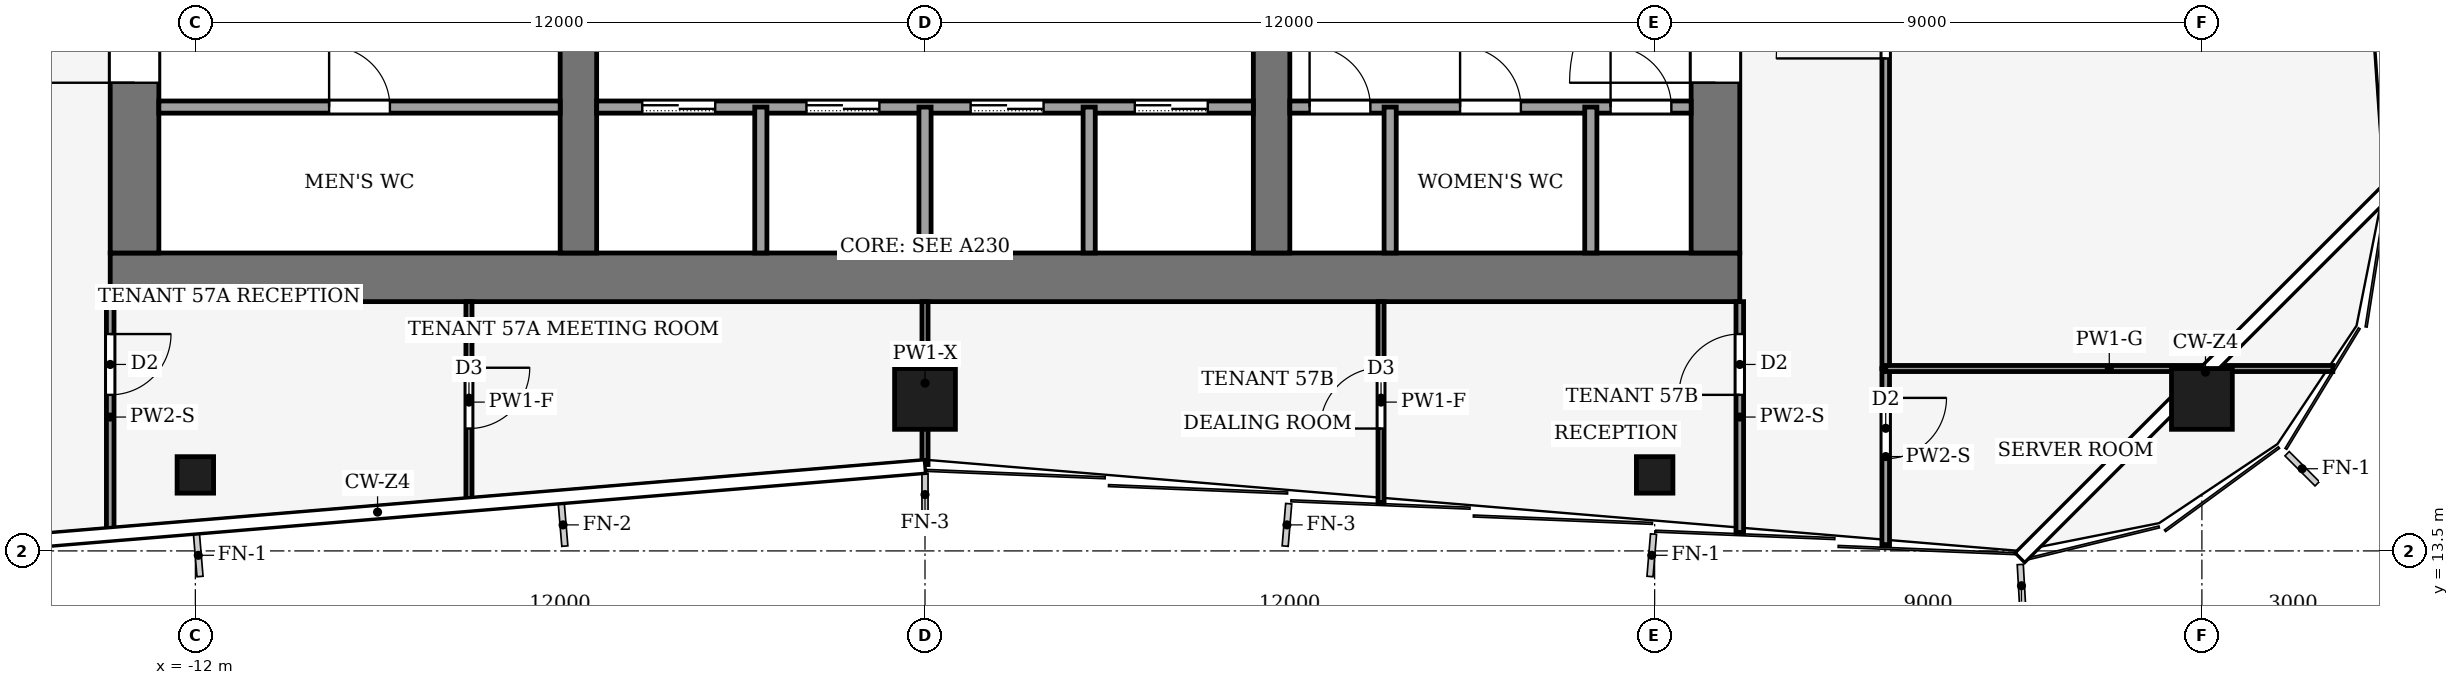
"""IFC4 building model, lengths in metres.
Left out: names, types, materials, properties, quantities, classifications, styles, units other than length and angle.
Written with IfcOpenShell. Run it as: python <this file> out.ifc"""

import sys

from ifc_helpers import new_model, si_unit, direction, frame, frame_2d, origin, origin_2d, place, context, subcontext, project, spatial, rectangle, hollow_rectangle, extrude, element, fill, save


model = new_model("IFC4")
c1 = context("Model", 3, precision=1e-05, world=origin(), true_north=direction((0.0, 1.0)))
c2 = subcontext(c1, "Body", "Model", "MODEL_VIEW")
j1 = project(units=[si_unit("LENGTHUNIT", "METRE"), si_unit("PLANEANGLEUNIT", "RADIAN")], contexts=[c1])
p1 = place(None, origin())
s1 = spatial("IfcSite", under=j1, at=p1, CompositionType="ELEMENT")
p2 = place(p1, origin())
s2 = spatial("IfcBuilding", under=s1, at=p2, CompositionType="ELEMENT")
p3 = place(p2, frame((0.0, 0.0, 250.0)))
s3 = spatial("IfcBuildingStorey", under=s2, at=p3, CompositionType="ELEMENT", Elevation=250.0)
p4 = place(p3, frame((-13.4, 18.0, -0.13), z_axis=(0.0, 0.0, 1.0), x_axis=(1.0, 0.0, 0.0)))
e1 = element("IfcWall", 1, at=p4, inside=s3, PredefinedType="SHEAR", context=c2, shape_type="SweptSolid", body=[
    extrude(rectangle(XDim=26.8, YDim=0.8, at=frame_2d((13.4, 0.0))), origin(), (0.0, 0.0, 1.0), 4.0),
])
p5 = place(p3, frame((-13.0, 18.4, -0.13), z_axis=(0.0, 0.0, 1.0), x_axis=(0.0, 1.0, 0.0)))
e2 = element("IfcWall", 2, at=p5, inside=s3, PredefinedType="SHEAR", context=c2, shape_type="SweptSolid", body=[
    extrude(rectangle(XDim=19.2, YDim=0.8, at=frame_2d((9.6, 0.0))), origin(), (0.0, 0.0, 1.0), 4.0),
])
p6 = place(p5, frame((2.8, 0.0, 0.13)))
e3 = element("IfcOpeningElement", 3, at=p6, cuts=e2, PredefinedType="OPENING", context=c2, shape_type="SweptSolid", body=[
    extrude(rectangle(XDim=2.4, YDim=2.4, at=frame_2d((1.2, 1.2))), frame((0.0, 0.41, 0.0), z_axis=(0.0, -1.0, 0.0), x_axis=(1.0, 0.0, 0.0)), (0.0, 0.0, 1.0), 0.82),
])
p7 = place(p5, frame((13.4, 0.0, 0.13)))
e4 = element("IfcOpeningElement", 4, at=p7, cuts=e2, PredefinedType="OPENING", context=c2, shape_type="SweptSolid", body=[
    extrude(rectangle(XDim=1.4, YDim=2.2, at=frame_2d((0.7, 1.1))), frame((0.0, 0.41, 0.0), z_axis=(0.0, -1.0, 0.0), x_axis=(1.0, 0.0, 0.0)), (0.0, 0.0, 1.0), 0.82),
])
p8 = place(p3, frame((13.0, 18.4, -0.13), z_axis=(0.0, 0.0, 1.0), x_axis=(0.0, 1.0, 0.0)))
e5 = element("IfcWall", 5, at=p8, inside=s3, PredefinedType="SHEAR", context=c2, shape_type="SweptSolid", body=[
    extrude(rectangle(XDim=19.2, YDim=0.8, at=frame_2d((9.6, 0.0))), origin(), (0.0, 0.0, 1.0), 4.0),
])
p9 = place(p8, frame((2.8, 0.0, 0.13)))
e6 = element("IfcOpeningElement", 6, at=p9, cuts=e5, PredefinedType="OPENING", context=c2, shape_type="SweptSolid", body=[
    extrude(rectangle(XDim=2.4, YDim=2.4, at=frame_2d((1.2, 1.2))), frame((0.0, 0.41, 0.0), z_axis=(0.0, -1.0, 0.0), x_axis=(1.0, 0.0, 0.0)), (0.0, 0.0, 1.0), 0.82),
])
p10 = place(p8, frame((13.3, 0.0, 0.13)))
e7 = element("IfcOpeningElement", 7, at=p10, cuts=e5, PredefinedType="OPENING", context=c2, shape_type="SweptSolid", body=[
    extrude(rectangle(XDim=2.4, YDim=2.4, at=frame_2d((1.2, 1.2))), frame((0.0, 0.41, 0.0), z_axis=(0.0, -1.0, 0.0), x_axis=(1.0, 0.0, 0.0)), (0.0, 0.0, 1.0), 0.82),
])
p11 = place(p3, frame((-5.7, 18.4, -0.13), z_axis=(0.0, 0.0, 1.0), x_axis=(0.0, 1.0, 0.0)))
e8 = element("IfcWall", 8, at=p11, inside=s3, PredefinedType="SHEAR", context=c2, shape_type="SweptSolid", body=[
    extrude(rectangle(XDim=19.2, YDim=0.6, at=frame_2d((9.6, 0.0))), origin(), (0.0, 0.0, 1.0), 4.0),
])
p12 = place(p11, frame((8.35, 0.0, 0.13)))
e9 = element("IfcOpeningElement", 9, at=p12, cuts=e8, PredefinedType="OPENING", context=c2, shape_type="SweptSolid", body=[
    extrude(rectangle(XDim=0.9, YDim=2.1, at=frame_2d((0.45, 1.05))), frame((0.0, 0.31, 0.0), z_axis=(0.0, -1.0, 0.0), x_axis=(1.0, 0.0, 0.0)), (0.0, 0.0, 1.0), 0.62),
])
p13 = place(p3, frame((5.7, 18.4, -0.13), z_axis=(0.0, 0.0, 1.0), x_axis=(0.0, 1.0, 0.0)))
e10 = element("IfcWall", 10, at=p13, inside=s3, PredefinedType="SHEAR", context=c2, shape_type="SweptSolid", body=[
    extrude(rectangle(XDim=19.2, YDim=0.6, at=frame_2d((9.6, 0.0))), origin(), (0.0, 0.0, 1.0), 4.0),
])
p14 = place(p13, frame((13.3, 0.0, 0.13)))
e11 = element("IfcOpeningElement", 11, at=p14, cuts=e10, PredefinedType="OPENING", context=c2, shape_type="SweptSolid", body=[
    extrude(rectangle(XDim=2.4, YDim=2.4, at=frame_2d((1.2, 1.2))), frame((0.0, 0.31, 0.0), z_axis=(0.0, -1.0, 0.0), x_axis=(1.0, 0.0, 0.0)), (0.0, 0.0, 1.0), 0.62),
])
for number, where, z_axis, x_axis in (
    (12, (21.0, 16.0, 0.0), (0.0, 0.0, 1.0), (1.0, 0.0, 0.0)),
    (13, (0.0, 16.0, 0.0), (0.0, 0.0, 1.0), (1.0, 0.0, 0.0)),
):
    element("IfcColumn", number, at=place(p3, frame(where, z_axis=z_axis, x_axis=x_axis)), inside=s3, PredefinedType="COLUMN", context=c2, shape_type="SweptSolid", body=[
        extrude(hollow_rectangle(XDim=1.0, YDim=1.0, WallThickness=0.045, at=origin_2d()), origin(), (0.0, 0.0, 1.0), 4.0),
    ])
for number, where, z_axis, x_axis in (
    (14, (-12.0, 14.75, 0.0), (0.0, 0.0, 1.0), (1.0, 0.0, 0.0)),
    (15, (12.0, 14.75, 0.0), (0.0, 0.0, 1.0), (1.0, 0.0, 0.0)),
):
    element("IfcColumn", number, at=place(p3, frame(where, z_axis=z_axis, x_axis=x_axis)), inside=s3, PredefinedType="COLUMN", context=c2, shape_type="SweptSolid", body=[
        extrude(hollow_rectangle(XDim=0.6, YDim=0.6, WallThickness=0.025, at=origin_2d()), origin(), (0.0, 0.0, 1.0), 4.0),
    ])
p15 = place(p3, frame((-12.6, 20.8, 0.0), z_axis=(0.0, 0.0, 1.0), x_axis=(1.0, 0.0, 0.0)))
e16 = element("IfcWall", 16, at=p15, inside=s3, PredefinedType="PARTITIONING", context=c2, shape_type="SweptSolid", body=[
    extrude(rectangle(XDim=6.6, YDim=0.2, at=frame_2d((3.3, 0.0))), origin(), (0.0, 0.0, 1.0), 3.87),
])
p16 = place(p15, frame((2.8, 0.0, 0.0)))
e17 = element("IfcOpeningElement", 17, at=p16, cuts=e16, PredefinedType="OPENING", context=c2, shape_type="SweptSolid", body=[
    extrude(rectangle(XDim=1.0, YDim=2.1, at=frame_2d((0.5, 1.05))), frame((0.0, 0.11, 0.0), z_axis=(0.0, -1.0, 0.0), x_axis=(1.0, 0.0, 0.0)), (0.0, 0.0, 1.0), 0.22),
])
p17 = place(p3, frame((-5.4, 20.8, 0.0), z_axis=(0.0, 0.0, 1.0), x_axis=(1.0, 0.0, 0.0)))
e18 = element("IfcWall", 18, at=p17, inside=s3, PredefinedType="PARTITIONING", context=c2, shape_type="SweptSolid", body=[
    extrude(rectangle(XDim=10.8, YDim=0.2, at=frame_2d((5.4, 0.0))), origin(), (0.0, 0.0, 1.0), 3.87),
])
p18 = place(p17, frame((0.75, 0.0, 0.0)))
e19 = element("IfcOpeningElement", 19, at=p18, cuts=e18, PredefinedType="OPENING", context=c2, shape_type="SweptSolid", body=[
    extrude(rectangle(XDim=1.2, YDim=2.2, at=frame_2d((0.6, 1.1))), frame((0.0, 0.11, 0.0), z_axis=(0.0, -1.0, 0.0), x_axis=(1.0, 0.0, 0.0)), (0.0, 0.0, 1.0), 0.22),
])
p19 = place(p17, frame((3.45, 0.0, 0.0)))
e20 = element("IfcOpeningElement", 20, at=p19, cuts=e18, PredefinedType="OPENING", context=c2, shape_type="SweptSolid", body=[
    extrude(rectangle(XDim=1.2, YDim=2.2, at=frame_2d((0.6, 1.1))), frame((0.0, 0.11, 0.0), z_axis=(0.0, -1.0, 0.0), x_axis=(1.0, 0.0, 0.0)), (0.0, 0.0, 1.0), 0.22),
])
p20 = place(p17, frame((6.15, 0.0, 0.0)))
e21 = element("IfcOpeningElement", 21, at=p20, cuts=e18, PredefinedType="OPENING", context=c2, shape_type="SweptSolid", body=[
    extrude(rectangle(XDim=1.2, YDim=2.2, at=frame_2d((0.6, 1.1))), frame((0.0, 0.11, 0.0), z_axis=(0.0, -1.0, 0.0), x_axis=(1.0, 0.0, 0.0)), (0.0, 0.0, 1.0), 0.22),
])
p21 = place(p17, frame((8.85, 0.0, 0.0)))
e22 = element("IfcOpeningElement", 22, at=p21, cuts=e18, PredefinedType="OPENING", context=c2, shape_type="SweptSolid", body=[
    extrude(rectangle(XDim=1.2, YDim=2.2, at=frame_2d((0.6, 1.1))), frame((0.0, 0.11, 0.0), z_axis=(0.0, -1.0, 0.0), x_axis=(1.0, 0.0, 0.0)), (0.0, 0.0, 1.0), 0.22),
])
p22 = place(p3, frame((6.0, 20.8, 0.0), z_axis=(0.0, 0.0, 1.0), x_axis=(1.0, 0.0, 0.0)))
e23 = element("IfcWall", 23, at=p22, inside=s3, PredefinedType="PARTITIONING", context=c2, shape_type="SweptSolid", body=[
    extrude(rectangle(XDim=6.6, YDim=0.2, at=frame_2d((3.3, 0.0))), origin(), (0.0, 0.0, 1.0), 3.87),
])
p23 = place(p22, frame((0.325, 0.0, 0.0)))
e24 = element("IfcOpeningElement", 24, at=p23, cuts=e23, PredefinedType="OPENING", context=c2, shape_type="SweptSolid", body=[
    extrude(rectangle(XDim=1.0, YDim=2.1, at=frame_2d((0.5, 1.05))), frame((0.0, 0.11, 0.0), z_axis=(0.0, -1.0, 0.0), x_axis=(1.0, 0.0, 0.0)), (0.0, 0.0, 1.0), 0.22),
])
p24 = place(p22, frame((2.8, 0.0, 0.0)))
e25 = element("IfcOpeningElement", 25, at=p24, cuts=e23, PredefinedType="OPENING", context=c2, shape_type="SweptSolid", body=[
    extrude(rectangle(XDim=1.0, YDim=2.1, at=frame_2d((0.5, 1.05))), frame((0.0, 0.11, 0.0), z_axis=(0.0, -1.0, 0.0), x_axis=(1.0, 0.0, 0.0)), (0.0, 0.0, 1.0), 0.22),
])
p25 = place(p22, frame((5.275, 0.0, 0.0)))
e26 = element("IfcOpeningElement", 26, at=p25, cuts=e23, PredefinedType="OPENING", context=c2, shape_type="SweptSolid", body=[
    extrude(rectangle(XDim=1.0, YDim=2.1, at=frame_2d((0.5, 1.05))), frame((0.0, 0.11, 0.0), z_axis=(0.0, -1.0, 0.0), x_axis=(1.0, 0.0, 0.0)), (0.0, 0.0, 1.0), 0.22),
])
for number, where, z_axis, x_axis in (
    (27, (-2.7, 18.4, 0.0), (0.0, 0.0, 1.0), (0.0, 1.0, 0.0)),
    (28, (0.0, 18.4, 0.0), (0.0, 0.0, 1.0), (0.0, 1.0, 0.0)),
    (29, (2.7, 18.4, 0.0), (0.0, 0.0, 1.0), (0.0, 1.0, 0.0)),
    (30, (7.65, 18.4, 0.0), (0.0, 0.0, 1.0), (0.0, 1.0, 0.0)),
    (31, (10.95, 18.4, 0.0), (0.0, 0.0, 1.0), (0.0, 1.0, 0.0)),
):
    element("IfcWall", number, at=place(p3, frame(where, z_axis=z_axis, x_axis=x_axis)), inside=s3, PredefinedType="PARTITIONING", context=c2, shape_type="SweptSolid", body=[
        extrude(rectangle(XDim=2.4, YDim=0.2, at=frame_2d((1.2, 0.0))), origin(), (0.0, 0.0, 1.0), 3.87),
    ])
p26 = place(p3, frame((15.8, 16.5, 0.0), z_axis=(0.0, 0.0, 1.0), x_axis=(0.0, -1.0, 0.0)))
e32 = element("IfcWall", 32, at=p26, inside=s3, PredefinedType="PARTITIONING", context=c2, shape_type="SweptSolid", body=[
    extrude(rectangle(XDim=2.897, YDim=0.125, at=frame_2d((1.448, 0.0))), origin(), (0.0, 0.0, 1.0), 3.04),
])
p27 = place(p26, frame((0.483, 0.0, 0.0)))
e33 = element("IfcOpeningElement", 33, at=p27, cuts=e32, PredefinedType="OPENING", context=c2, shape_type="SweptSolid", body=[
    extrude(rectangle(XDim=1.0, YDim=2.1, at=frame_2d((0.5, 1.05))), frame((0.0, 0.073, 0.0), z_axis=(0.0, -1.0, 0.0), x_axis=(1.0, 0.0, 0.0)), (0.0, 0.0, 1.0), 0.145),
])
p28 = place(p3, frame((15.8, 16.5, 0.0), z_axis=(0.0, 0.0, 1.0), x_axis=(0.0, 1.0, 0.0)))
e34 = element("IfcWall", 34, at=p28, inside=s3, PredefinedType="PARTITIONING", context=c2, shape_type="SweptSolid", body=[
    extrude(rectangle(XDim=12.0, YDim=0.125, at=frame_2d((6.0, 0.0))), origin(), (0.0, 0.0, 1.0), 3.14),
])
p29 = place(p28, frame((5.1, 0.0, 0.0)))
e35 = element("IfcOpeningElement", 35, at=p29, cuts=e34, PredefinedType="OPENING", context=c2, shape_type="SweptSolid", body=[
    extrude(rectangle(XDim=1.8, YDim=2.1, at=frame_2d((0.9, 1.05))), frame((0.0, 0.073, 0.0), z_axis=(0.0, -1.0, 0.0), x_axis=(1.0, 0.0, 0.0)), (0.0, 0.0, 1.0), 0.145),
])
p30 = place(p3, frame((-13.4, 17.6, 0.0), z_axis=(0.0, 0.0, 1.0), x_axis=(0.0, -1.0, 0.0)))
e36 = element("IfcWall", 36, at=p30, inside=s3, PredefinedType="PARTITIONING", context=c2, shape_type="SweptSolid", body=[
    extrude(rectangle(XDim=3.797, YDim=0.125, at=frame_2d((1.898, 0.0))), origin(), (0.0, 0.0, 1.0), 3.04),
])
p31 = place(p30, frame((0.533, 0.0, 0.0)))
e37 = element("IfcOpeningElement", 37, at=p31, cuts=e36, PredefinedType="OPENING", context=c2, shape_type="SweptSolid", body=[
    extrude(rectangle(XDim=1.0, YDim=2.1, at=frame_2d((0.5, 1.05))), frame((0.0, 0.073, 0.0), z_axis=(0.0, -1.0, 0.0), x_axis=(1.0, 0.0, 0.0)), (0.0, 0.0, 1.0), 0.145),
])
p32 = place(p3, frame((13.4, 13.803, 0.0), z_axis=(0.0, 0.0, 1.0), x_axis=(0.0, 1.0, 0.0)))
e38 = element("IfcWall", 38, at=p32, inside=s3, PredefinedType="PARTITIONING", context=c2, shape_type="SweptSolid", body=[
    extrude(rectangle(XDim=3.797, YDim=0.125, at=frame_2d((1.898, 0.0))), origin(), (0.0, 0.0, 1.0), 3.04),
])
p33 = place(p32, frame((2.263, 0.0, 0.0)))
e39 = element("IfcOpeningElement", 39, at=p33, cuts=e38, PredefinedType="OPENING", context=c2, shape_type="SweptSolid", body=[
    extrude(rectangle(XDim=1.0, YDim=2.1, at=frame_2d((0.5, 1.05))), frame((0.0, 0.073, 0.0), z_axis=(0.0, -1.0, 0.0), x_axis=(1.0, 0.0, 0.0)), (0.0, 0.0, 1.0), 0.145),
])
p34 = place(p3, frame((23.153, 16.5, 0.0), z_axis=(0.0, 0.0, 1.0), x_axis=(-1.0, 0.0, 0.0)))
e40 = element("IfcWall", 40, at=p34, inside=s3, PredefinedType="PARTITIONING", context=c2, shape_type="SweptSolid", body=[
    extrude(rectangle(XDim=7.353, YDim=0.1, at=frame_2d((3.676, 0.0))), origin(), (0.0, 0.0, 1.0), 2.93),
])
p35 = place(p3, frame((-7.5, 17.6, 0.0), z_axis=(0.0, 0.0, 1.0), x_axis=(0.0, -1.0, 0.0)))
e41 = element("IfcWall", 41, at=p35, inside=s3, PredefinedType="PARTITIONING", context=c2, shape_type="SweptSolid", body=[
    extrude(rectangle(XDim=3.305, YDim=0.1, at=frame_2d((1.653, 0.0))), origin(), (0.0, 0.0, 1.0), 3.04),
])
p36 = place(p35, frame((1.087, 0.0, 0.0)))
e42 = element("IfcOpeningElement", 42, at=p36, cuts=e41, PredefinedType="OPENING", context=c2, shape_type="SweptSolid", body=[
    extrude(rectangle(XDim=1.0, YDim=2.1, at=frame_2d((0.5, 1.05))), frame((0.0, 0.06, 0.0), z_axis=(0.0, -1.0, 0.0), x_axis=(1.0, 0.0, 0.0)), (0.0, 0.0, 1.0), 0.12),
])
p37 = place(p3, frame((0.0, 14.92, 0.0), z_axis=(0.0, 0.0, 1.0), x_axis=(0.0, 1.0, 0.0)))
e43 = element("IfcWall", 43, at=p37, inside=s3, PredefinedType="PARTITIONING", context=c2, shape_type="SweptSolid", body=[
    extrude(rectangle(XDim=2.68, YDim=0.1, at=frame_2d((1.34, 0.0))), origin(), (0.0, 0.0, 1.0), 3.54),
])
p38 = place(p3, frame((7.5, 14.295, 0.0), z_axis=(0.0, 0.0, 1.0), x_axis=(0.0, 1.0, 0.0)))
e44 = element("IfcWall", 44, at=p38, inside=s3, PredefinedType="PARTITIONING", context=c2, shape_type="SweptSolid", body=[
    extrude(rectangle(XDim=3.305, YDim=0.1, at=frame_2d((1.653, 0.0))), origin(), (0.0, 0.0, 1.0), 3.04),
])
p39 = place(p38, frame((1.218, 0.0, 0.0)))
e45 = element("IfcOpeningElement", 45, at=p39, cuts=e44, PredefinedType="OPENING", context=c2, shape_type="SweptSolid", body=[
    extrude(rectangle(XDim=1.0, YDim=2.1, at=frame_2d((0.5, 1.05))), frame((0.0, 0.06, 0.0), z_axis=(0.0, -1.0, 0.0), x_axis=(1.0, 0.0, 0.0)), (0.0, 0.0, 1.0), 0.12),
])
p40 = place(p18, origin())
e46 = element("IfcDoor", 46, at=p40, inside=s3, OperationType="SLIDING_TO_LEFT", PredefinedType="DOOR", context=c2, shape_type="SweptSolid", body=[
    extrude(rectangle(XDim=1.2, YDim=2.2, at=frame_2d((0.6, 1.1))), frame((0.0, 0.025, 0.0), z_axis=(0.0, -1.0, 0.0), x_axis=(1.0, 0.0, 0.0)), (0.0, 0.0, 1.0), 0.05),
])
fill(e19, e46)
p41 = place(p19, origin())
e47 = element("IfcDoor", 47, at=p41, inside=s3, OperationType="SLIDING_TO_LEFT", PredefinedType="DOOR", context=c2, shape_type="SweptSolid", body=[
    extrude(rectangle(XDim=1.2, YDim=2.2, at=frame_2d((0.6, 1.1))), frame((0.0, 0.025, 0.0), z_axis=(0.0, -1.0, 0.0), x_axis=(1.0, 0.0, 0.0)), (0.0, 0.0, 1.0), 0.05),
])
fill(e20, e47)
p42 = place(p20, origin())
e48 = element("IfcDoor", 48, at=p42, inside=s3, OperationType="SLIDING_TO_LEFT", PredefinedType="DOOR", context=c2, shape_type="SweptSolid", body=[
    extrude(rectangle(XDim=1.2, YDim=2.2, at=frame_2d((0.6, 1.1))), frame((0.0, 0.025, 0.0), z_axis=(0.0, -1.0, 0.0), x_axis=(1.0, 0.0, 0.0)), (0.0, 0.0, 1.0), 0.05),
])
fill(e21, e48)
p43 = place(p21, origin())
e49 = element("IfcDoor", 49, at=p43, inside=s3, OperationType="SLIDING_TO_LEFT", PredefinedType="DOOR", context=c2, shape_type="SweptSolid", body=[
    extrude(rectangle(XDim=1.2, YDim=2.2, at=frame_2d((0.6, 1.1))), frame((0.0, 0.025, 0.0), z_axis=(0.0, -1.0, 0.0), x_axis=(1.0, 0.0, 0.0)), (0.0, 0.0, 1.0), 0.05),
])
fill(e22, e49)
p44 = place(p16, origin())
e50 = element("IfcDoor", 50, at=p44, inside=s3, OperationType="SINGLE_SWING_LEFT", PredefinedType="DOOR", context=c2, shape_type="SweptSolid", body=[
    extrude(rectangle(XDim=1.0, YDim=2.1, at=frame_2d((0.5, 1.05))), frame((0.0, 0.025, 0.0), z_axis=(0.0, -1.0, 0.0), x_axis=(1.0, 0.0, 0.0)), (0.0, 0.0, 1.0), 0.05),
])
fill(e17, e50)
p45 = place(p23, origin())
e51 = element("IfcDoor", 51, at=p45, inside=s3, OperationType="SINGLE_SWING_LEFT", PredefinedType="DOOR", context=c2, shape_type="SweptSolid", body=[
    extrude(rectangle(XDim=1.0, YDim=2.1, at=frame_2d((0.5, 1.05))), frame((0.0, 0.025, 0.0), z_axis=(0.0, -1.0, 0.0), x_axis=(1.0, 0.0, 0.0)), (0.0, 0.0, 1.0), 0.05),
])
fill(e24, e51)
p46 = place(p24, origin())
e52 = element("IfcDoor", 52, at=p46, inside=s3, OperationType="SINGLE_SWING_LEFT", PredefinedType="DOOR", context=c2, shape_type="SweptSolid", body=[
    extrude(rectangle(XDim=1.0, YDim=2.1, at=frame_2d((0.5, 1.05))), frame((0.0, 0.025, 0.0), z_axis=(0.0, -1.0, 0.0), x_axis=(1.0, 0.0, 0.0)), (0.0, 0.0, 1.0), 0.05),
])
fill(e25, e52)
p47 = place(p25, origin())
e53 = element("IfcDoor", 53, at=p47, inside=s3, OperationType="SINGLE_SWING_LEFT", PredefinedType="DOOR", context=c2, shape_type="SweptSolid", body=[
    extrude(rectangle(XDim=1.0, YDim=2.1, at=frame_2d((0.5, 1.05))), frame((0.0, 0.025, 0.0), z_axis=(0.0, -1.0, 0.0), x_axis=(1.0, 0.0, 0.0)), (0.0, 0.0, 1.0), 0.05),
])
fill(e26, e53)
p48 = place(p6, origin())
e54 = element("IfcDoor", 54, at=p48, inside=s3, OperationType="DOUBLE_DOOR_SINGLE_SWING", PredefinedType="DOOR", context=c2, shape_type="SweptSolid", body=[
    extrude(rectangle(XDim=2.4, YDim=2.4, at=frame_2d((1.2, 1.2))), frame((0.0, 0.025, 0.0), z_axis=(0.0, -1.0, 0.0), x_axis=(1.0, 0.0, 0.0)), (0.0, 0.0, 1.0), 0.05),
])
fill(e3, e54)
p49 = place(p9, origin())
e55 = element("IfcDoor", 55, at=p49, inside=s3, OperationType="DOUBLE_DOOR_SINGLE_SWING", PredefinedType="DOOR", context=c2, shape_type="SweptSolid", body=[
    extrude(rectangle(XDim=2.4, YDim=2.4, at=frame_2d((1.2, 1.2))), frame((0.0, 0.025, 0.0), z_axis=(0.0, -1.0, 0.0), x_axis=(1.0, 0.0, 0.0)), (0.0, 0.0, 1.0), 0.05),
])
fill(e6, e55)
p50 = place(p27, origin())
e56 = element("IfcDoor", 56, at=p50, inside=s3, OperationType="SINGLE_SWING_LEFT", PredefinedType="DOOR", context=c2, shape_type="SweptSolid", body=[
    extrude(rectangle(XDim=1.0, YDim=2.1, at=frame_2d((0.5, 1.05))), frame((0.0, 0.025, 0.0), z_axis=(0.0, -1.0, 0.0), x_axis=(1.0, 0.0, 0.0)), (0.0, 0.0, 1.0), 0.05),
])
fill(e33, e56)
p51 = place(p29, origin())
e57 = element("IfcDoor", 57, at=p51, inside=s3, OperationType="DOUBLE_DOOR_SINGLE_SWING", PredefinedType="DOOR", context=c2, shape_type="SweptSolid", body=[
    extrude(rectangle(XDim=1.8, YDim=2.1, at=frame_2d((0.9, 1.05))), frame((0.0, 0.025, 0.0), z_axis=(0.0, -1.0, 0.0), x_axis=(1.0, 0.0, 0.0)), (0.0, 0.0, 1.0), 0.05),
])
fill(e35, e57)
p52 = place(p31, origin())
e58 = element("IfcDoor", 58, at=p52, inside=s3, OperationType="SINGLE_SWING_LEFT", PredefinedType="DOOR", context=c2, shape_type="SweptSolid", body=[
    extrude(rectangle(XDim=1.0, YDim=2.1, at=frame_2d((0.5, 1.05))), frame((0.0, 0.025, 0.0), z_axis=(0.0, -1.0, 0.0), x_axis=(1.0, 0.0, 0.0)), (0.0, 0.0, 1.0), 0.05),
])
fill(e37, e58)
p53 = place(p33, origin())
e59 = element("IfcDoor", 59, at=p53, inside=s3, OperationType="SINGLE_SWING_RIGHT", PredefinedType="DOOR", context=c2, shape_type="SweptSolid", body=[
    extrude(rectangle(XDim=1.0, YDim=2.1, at=frame_2d((0.5, 1.05))), frame((0.0, 0.025, 0.0), z_axis=(0.0, -1.0, 0.0), x_axis=(1.0, 0.0, 0.0)), (0.0, 0.0, 1.0), 0.05),
])
fill(e39, e59)
p54 = place(p36, origin())
e60 = element("IfcDoor", 60, at=p54, inside=s3, OperationType="SINGLE_SWING_LEFT", PredefinedType="DOOR", context=c2, shape_type="SweptSolid", body=[
    extrude(rectangle(XDim=1.0, YDim=2.1, at=frame_2d((0.5, 1.05))), frame((0.0, 0.025, 0.0), z_axis=(0.0, -1.0, 0.0), x_axis=(1.0, 0.0, 0.0)), (0.0, 0.0, 1.0), 0.05),
])
fill(e42, e60)
p55 = place(p39, origin())
e61 = element("IfcDoor", 61, at=p55, inside=s3, OperationType="SINGLE_SWING_RIGHT", PredefinedType="DOOR", context=c2, shape_type="SweptSolid", body=[
    extrude(rectangle(XDim=1.0, YDim=2.1, at=frame_2d((0.5, 1.05))), frame((0.0, 0.025, 0.0), z_axis=(0.0, -1.0, 0.0), x_axis=(1.0, 0.0, 0.0)), (0.0, 0.0, 1.0), 0.05),
])
fill(e45, e61)
save(model, sys.argv[1])
